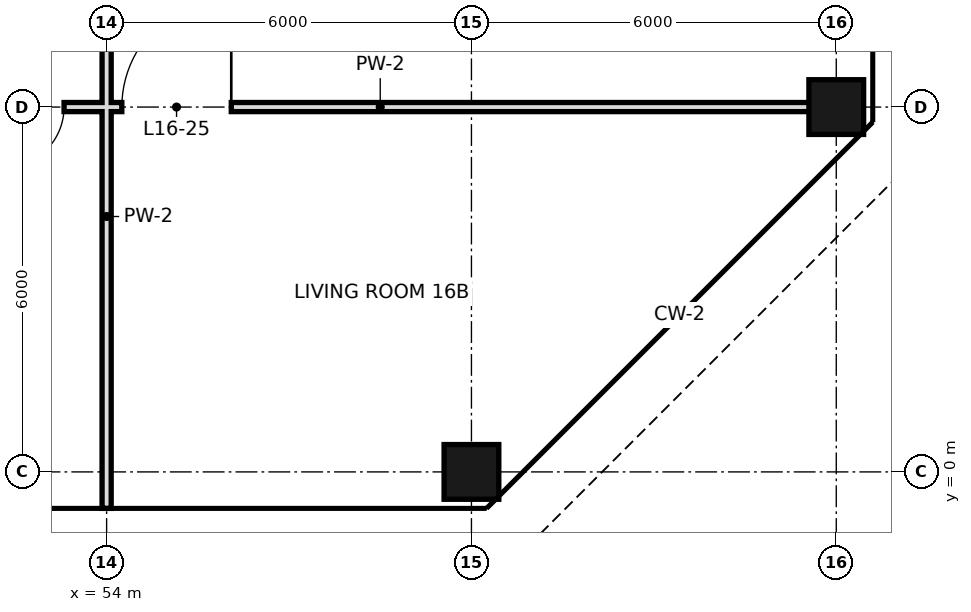
"""IFC4 building model, lengths in metres.
Left out: names, types, materials, properties, quantities, classifications, styles, units other than length and angle.
Written with IfcOpenShell. Run it as: python <this file> out.ifc"""

import sys

from ifc_helpers import new_model, si_unit, direction, frame, frame_2d, origin, origin_2d, place, context, subcontext, project, spatial, rectangle, hollow_rectangle, extrude, element, fill, save


model = new_model("IFC4")
c1 = context("Model", 3, precision=1e-05, world=origin(), true_north=direction((0.0, 1.0)))
c2 = subcontext(c1, "Body", "Model", "MODEL_VIEW")
j1 = project(units=[si_unit("LENGTHUNIT", "METRE"), si_unit("PLANEANGLEUNIT", "RADIAN")], contexts=[c1])
p1 = place(None, origin())
s1 = spatial("IfcSite", under=j1, at=p1, CompositionType="ELEMENT")
p2 = place(p1, origin())
s2 = spatial("IfcBuilding", under=s1, at=p2, CompositionType="ELEMENT")
p3 = place(p2, frame((0.0, 0.0, 78.6)))
s3 = spatial("IfcBuildingStorey", under=s2, at=p3, CompositionType="ELEMENT", Elevation=78.6)
for number, where, z_axis, x_axis in (
    (1, (60.0, 0.0, 0.0), (0.0, 0.0, 1.0), (1.0, 0.0, 0.0)),
    (2, (66.0, 6.0, 0.0), (0.0, 0.0, 1.0), (1.0, 0.0, 0.0)),
):
    element("IfcColumn", number, at=place(p3, frame(where, z_axis=z_axis, x_axis=x_axis)), inside=s3, PredefinedType="COLUMN", context=c2, shape_type="SweptSolid", body=[
        extrude(hollow_rectangle(XDim=0.9, YDim=0.9, WallThickness=0.045, at=origin_2d()), origin(), (0.0, 0.0, 1.0), 3.6),
    ])
p4 = place(p3, frame((54.0, -0.6, 0.0), z_axis=(0.0, 0.0, 1.0), x_axis=(0.0, 1.0, 0.0)))
e3 = element("IfcWall", 3, at=p4, inside=s3, PredefinedType="PARTITIONING", context=c2, shape_type="SweptSolid", body=[
    extrude(rectangle(XDim=9.6, YDim=0.15, at=frame_2d((4.8, 0.0))), origin(), (0.0, 0.0, 1.0), 3.42),
])
p5 = place(p3, frame((51.0, 6.0, 0.0), z_axis=(0.0, 0.0, 1.0), x_axis=(1.0, 0.0, 0.0)))
e4 = element("IfcWall", 4, at=p5, inside=s3, PredefinedType="PARTITIONING", context=c2, shape_type="SweptSolid", body=[
    extrude(rectangle(XDim=15.0, YDim=0.15, at=frame_2d((7.5, 0.0))), origin(), (0.0, 0.0, 1.0), 2.52),
])
p6 = place(p5, frame((1.3, 0.0, 0.0)))
e5 = element("IfcOpeningElement", 5, at=p6, cuts=e4, PredefinedType="OPENING", context=c2, shape_type="SweptSolid", body=[
    extrude(rectangle(XDim=1.0, YDim=2.4, at=frame_2d((0.5, 1.2))), frame((0.0, 0.085, 0.0), z_axis=(0.0, -1.0, 0.0), x_axis=(1.0, 0.0, 0.0)), (0.0, 0.0, 1.0), 0.17),
])
p7 = place(p5, frame((3.25, 0.0, 0.0)))
e6 = element("IfcOpeningElement", 6, at=p7, cuts=e4, PredefinedType="OPENING", context=c2, shape_type="SweptSolid", body=[
    extrude(rectangle(XDim=1.8, YDim=2.4, at=frame_2d((0.9, 1.2))), frame((0.0, 0.085, 0.0), z_axis=(0.0, -1.0, 0.0), x_axis=(1.0, 0.0, 0.0)), (0.0, 0.0, 1.0), 0.17),
])
p8 = place(p6, frame((1.0, 0.0, 0.0), z_axis=(0.0, 0.0, 1.0), x_axis=(-1.0, 0.0, 0.0)))
e7 = element("IfcDoor", 7, at=p8, inside=s3, OperationType="SINGLE_SWING_RIGHT", PredefinedType="DOOR", context=c2, shape_type="SweptSolid", body=[
    extrude(rectangle(XDim=1.0, YDim=2.4, at=frame_2d((0.5, 1.2))), frame((0.0, 0.025, 0.0), z_axis=(0.0, -1.0, 0.0), x_axis=(1.0, 0.0, 0.0)), (0.0, 0.0, 1.0), 0.05),
])
fill(e5, e7)
p9 = place(p7, frame((1.8, 0.0, 0.0), z_axis=(0.0, 0.0, 1.0), x_axis=(-1.0, 0.0, 0.0)))
e8 = element("IfcDoor", 8, at=p9, inside=s3, OperationType="SINGLE_SWING_LEFT", PredefinedType="DOOR", context=c2, shape_type="SweptSolid", body=[
    extrude(rectangle(XDim=1.8, YDim=2.4, at=frame_2d((0.9, 1.2))), frame((0.0, 0.025, 0.0), z_axis=(0.0, -1.0, 0.0), x_axis=(1.0, 0.0, 0.0)), (0.0, 0.0, 1.0), 0.05),
])
fill(e6, e8)
save(model, sys.argv[1])
